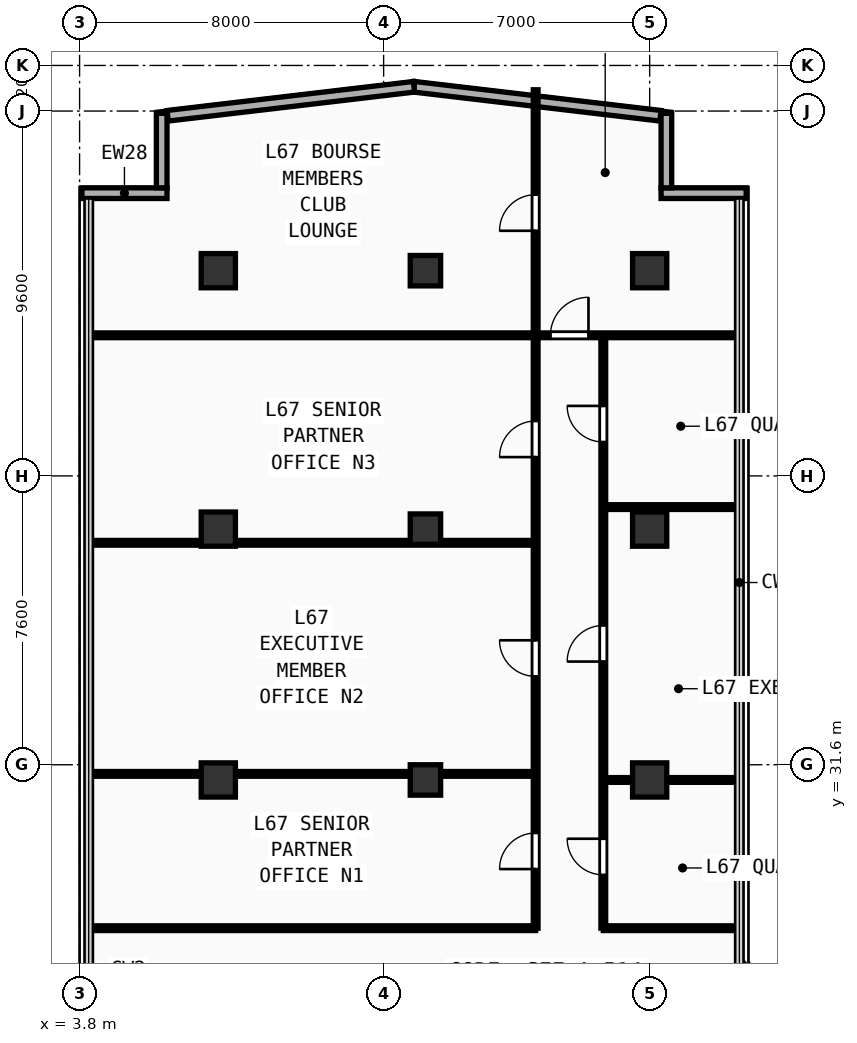
"""IFC4 building model, lengths in metres.
Left out: names, types, materials, properties, quantities, classifications, styles, units other than length and angle.
Written with IfcOpenShell. Run it as: python <this file> out.ifc"""

import sys

from ifc_helpers import new_model, si_unit, direction, frame, frame_2d, origin, origin_2d, place, context, subcontext, project, spatial, rectangle, extrude, element, fill, save


model = new_model("IFC4")
c1 = context("Model", 3, precision=1e-05, world=origin(), true_north=direction((0.0, 1.0)))
c2 = subcontext(c1, "Body", "Model", "MODEL_VIEW")
j1 = project(units=[si_unit("LENGTHUNIT", "METRE"), si_unit("PLANEANGLEUNIT", "RADIAN")], contexts=[c1])
p1 = place(None, origin())
s1 = spatial("IfcSite", under=j1, at=p1, CompositionType="ELEMENT")
p2 = place(p1, origin())
s2 = spatial("IfcBuilding", under=s1, at=p2, CompositionType="ELEMENT")
p3 = place(p2, frame((0.0, 0.0, 262.8)))
s3 = spatial("IfcBuildingStorey", under=s2, at=p3, CompositionType="ELEMENT", Elevation=262.8)
for number, where, z_axis, x_axis in (
    (1, (7.45, 31.2, 0.0), (0.0, 0.0, 1.0), (1.0, 0.0, 0.0)),
    (2, (7.45, 37.8, 0.0), (0.0, 0.0, 1.0), (1.0, 0.0, 0.0)),
    (3, (7.45, 44.6, 0.0), (0.0, 0.0, 1.0), (1.0, 0.0, 0.0)),
    (4, (18.8, 31.2, 0.0), (0.0, 0.0, 1.0), (1.0, 0.0, 0.0)),
    (5, (18.8, 37.8, 0.0), (0.0, 0.0, 1.0), (1.0, 0.0, 0.0)),
    (6, (18.8, 44.6, 0.0), (0.0, 0.0, 1.0), (1.0, 0.0, 0.0)),
):
    element("IfcColumn", number, at=place(p3, frame(where, z_axis=z_axis, x_axis=x_axis)), inside=s3, PredefinedType="COLUMN", context=c2, shape_type="SweptSolid", body=[
        extrude(rectangle(XDim=0.9, YDim=0.9, at=origin_2d()), origin(), (0.0, 0.0, 1.0), 3.56),
    ])
for number, where, z_axis, x_axis in (
    (7, (12.9, 31.2, 0.0), (0.0, 0.0, 1.0), (1.0, 0.0, 0.0)),
    (8, (12.9, 37.8, 0.0), (0.0, 0.0, 1.0), (1.0, 0.0, 0.0)),
    (9, (12.9, 44.6, 0.0), (0.0, 0.0, 1.0), (1.0, 0.0, 0.0)),
):
    element("IfcColumn", number, at=place(p3, frame(where, z_axis=z_axis, x_axis=x_axis)), inside=s3, PredefinedType="COLUMN", context=c2, shape_type="SweptSolid", body=[
        extrude(rectangle(XDim=0.8, YDim=0.8, at=origin_2d()), origin(), (0.0, 0.0, 1.0), 3.56),
    ])
p4 = place(p3, frame((19.1, 46.64, 0.0), z_axis=(0.0, 0.0, 1.0), x_axis=(1.0, 0.0, 0.0)))
e10 = element("IfcWall", 10, at=p4, inside=s3, PredefinedType="SOLIDWALL", context=c2, shape_type="SweptSolid", body=[
    extrude(rectangle(XDim=2.24, YDim=0.28, at=frame_2d((1.12, 0.0))), origin(), (0.0, 0.0, 1.0), 3.56),
])
p5 = place(p3, frame((19.24, 46.78, 0.0), z_axis=(0.0, 0.0, 1.0), x_axis=(0.0, 1.0, 0.0)))
e11 = element("IfcWall", 11, at=p5, inside=s3, PredefinedType="SOLIDWALL", context=c2, shape_type="SweptSolid", body=[
    extrude(rectangle(XDim=1.96, YDim=0.28, at=frame_2d((0.98, 0.0))), origin(), (0.0, 0.0, 1.0), 3.56),
])
p6 = place(p3, frame((3.86, 46.64, 0.0), z_axis=(0.0, 0.0, 1.0), x_axis=(1.0, 0.0, 0.0)))
e12 = element("IfcWall", 12, at=p6, inside=s3, PredefinedType="SOLIDWALL", context=c2, shape_type="SweptSolid", body=[
    extrude(rectangle(XDim=2.24, YDim=0.28, at=frame_2d((1.12, 0.0))), origin(), (0.0, 0.0, 1.0), 3.56),
])
p7 = place(p3, frame((5.96, 46.78, 0.0), z_axis=(0.0, 0.0, 1.0), x_axis=(0.0, 1.0, 0.0)))
e13 = element("IfcWall", 13, at=p7, inside=s3, PredefinedType="SOLIDWALL", context=c2, shape_type="SweptSolid", body=[
    extrude(rectangle(XDim=1.96, YDim=0.28, at=frame_2d((0.98, 0.0))), origin(), (0.0, 0.0, 1.0), 3.56),
])
p8 = place(p3, frame((27.685, 19.775, 0.0), z_axis=(0.0, 0.0, 1.0), x_axis=(-0.707106781187, 0.707106781187, 0.0)))
e14 = element("IfcWall", 14, at=p8, inside=s3, PredefinedType="SOLIDWALL", context=c2, shape_type="SweptSolid", body=[
    extrude(rectangle(XDim=9.207, YDim=0.28, at=frame_2d((4.603, 0.0))), origin(), (0.0, 0.0, 1.0), 3.56),
])
for number, where, z_axis, x_axis in (
    (15, (19.083, 48.676, 0.0), (0.0, 0.0, 1.0), (-0.993, 0.117, 0.0)),
    (16, (12.599, 49.439, 0.0), (0.0, 0.0, 1.0), (-0.993, -0.117, 0.0)),
):
    element("IfcWall", number, at=place(p3, frame(where, z_axis=z_axis, x_axis=x_axis)), inside=s3, PredefinedType="SOLIDWALL", context=c2, shape_type="SweptSolid", body=[
        extrude(rectangle(XDim=6.527, YDim=0.28, at=frame_2d((3.263, 0.0))), origin(), (0.0, 0.0, 1.0), 3.56),
    ])
p9 = place(p3, frame((4.04, 27.3, 0.0), z_axis=(0.0, 0.0, 1.0), x_axis=(1.0, 0.0, 0.0)))
e17 = element("IfcWall", 17, at=p9, inside=s3, PredefinedType="PARTITIONING", context=c2, shape_type="SweptSolid", body=[
    extrude(rectangle(XDim=11.76, YDim=0.125, at=frame_2d((5.88, 0.0))), origin(), (0.0, 0.0, 1.0), 3.56),
])
p10 = place(p3, frame((15.8, 27.3, 0.0), z_axis=(0.0, 0.0, 1.0), x_axis=(0.0, 1.0, 0.0)))
e18 = element("IfcWall", 18, at=p10, inside=s3, PredefinedType="PARTITIONING", context=c2, shape_type="SweptSolid", body=[
    extrude(rectangle(XDim=15.6, YDim=0.125, at=frame_2d((7.8, 0.0))), origin(), (0.0, 0.0, 1.0), 3.56),
])
p11 = place(p10, frame((1.555, 0.0, 0.0)))
e19 = element("IfcOpeningElement", 19, at=p11, cuts=e18, PredefinedType="OPENING", context=c2, shape_type="SweptSolid", body=[
    extrude(rectangle(XDim=0.95, YDim=2.15, at=frame_2d((0.475, 1.075))), frame((0.0, 0.073, 0.0), z_axis=(0.0, -1.0, 0.0), x_axis=(1.0, 0.0, 0.0)), (0.0, 0.0, 1.0), 0.145),
])
p12 = place(p10, frame((6.625, 0.0, 0.0)))
e20 = element("IfcOpeningElement", 20, at=p12, cuts=e18, PredefinedType="OPENING", context=c2, shape_type="SweptSolid", body=[
    extrude(rectangle(XDim=0.95, YDim=2.15, at=frame_2d((0.475, 1.075))), frame((0.0, 0.073, 0.0), z_axis=(0.0, -1.0, 0.0), x_axis=(1.0, 0.0, 0.0)), (0.0, 0.0, 1.0), 0.145),
])
p13 = place(p10, frame((12.395, 0.0, 0.0)))
e21 = element("IfcOpeningElement", 21, at=p13, cuts=e18, PredefinedType="OPENING", context=c2, shape_type="SweptSolid", body=[
    extrude(rectangle(XDim=0.95, YDim=2.15, at=frame_2d((0.475, 1.075))), frame((0.0, 0.073, 0.0), z_axis=(0.0, -1.0, 0.0), x_axis=(1.0, 0.0, 0.0)), (0.0, 0.0, 1.0), 0.145),
])
for number, where, z_axis, x_axis in (
    (22, (4.04, 31.36, 0.0), (0.0, 0.0, 1.0), (1.0, 0.0, 0.0)),
    (23, (4.04, 37.44, 0.0), (0.0, 0.0, 1.0), (1.0, 0.0, 0.0)),
):
    element("IfcWall", number, at=place(p3, frame(where, z_axis=z_axis, x_axis=x_axis)), inside=s3, PredefinedType="PARTITIONING", context=c2, shape_type="SweptSolid", body=[
        extrude(rectangle(XDim=11.76, YDim=0.125, at=frame_2d((5.88, 0.0))), origin(), (0.0, 0.0, 1.0), 2.798),
    ])
p14 = place(p3, frame((4.04, 42.9, 0.0), z_axis=(0.0, 0.0, 1.0), x_axis=(1.0, 0.0, 0.0)))
e24 = element("IfcWall", 24, at=p14, inside=s3, PredefinedType="PARTITIONING", context=c2, shape_type="SweptSolid", body=[
    extrude(rectangle(XDim=17.12, YDim=0.125, at=frame_2d((8.56, 0.0))), origin(), (0.0, 0.0, 1.0), 3.56),
])
p15 = place(p14, frame((12.15, 0.0, 0.0)))
e25 = element("IfcOpeningElement", 25, at=p15, cuts=e24, PredefinedType="OPENING", context=c2, shape_type="SweptSolid", body=[
    extrude(rectangle(XDim=1.0, YDim=2.2, at=frame_2d((0.5, 1.1))), frame((0.0, 0.073, 0.0), z_axis=(0.0, -1.0, 0.0), x_axis=(1.0, 0.0, 0.0)), (0.0, 0.0, 1.0), 0.145),
])
p16 = place(p3, frame((15.8, 42.9, 0.0), z_axis=(0.0, 0.0, 1.0), x_axis=(0.0, 1.0, 0.0)))
e26 = element("IfcWall", 26, at=p16, inside=s3, PredefinedType="PARTITIONING", context=c2, shape_type="SweptSolid", body=[
    extrude(rectangle(XDim=6.46, YDim=0.125, at=frame_2d((3.23, 0.0))), origin(), (0.0, 0.0, 1.0), 3.56),
])
p17 = place(p16, frame((2.75, 0.0, 0.0)))
e27 = element("IfcOpeningElement", 27, at=p17, cuts=e26, PredefinedType="OPENING", context=c2, shape_type="SweptSolid", body=[
    extrude(rectangle(XDim=0.95, YDim=2.15, at=frame_2d((0.475, 1.075))), frame((0.0, 0.073, 0.0), z_axis=(0.0, -1.0, 0.0), x_axis=(1.0, 0.0, 0.0)), (0.0, 0.0, 1.0), 0.145),
])
p18 = place(p3, frame((17.58, 27.3, 0.0), z_axis=(0.0, 0.0, 1.0), x_axis=(1.0, 0.0, 0.0)))
e28 = element("IfcWall", 28, at=p18, inside=s3, PredefinedType="PARTITIONING", context=c2, shape_type="SweptSolid", body=[
    extrude(rectangle(XDim=3.58, YDim=0.125, at=frame_2d((1.79, 0.0))), origin(), (0.0, 0.0, 1.0), 3.56),
])
p19 = place(p3, frame((17.58, 27.3, 0.0), z_axis=(0.0, 0.0, 1.0), x_axis=(0.0, 1.0, 0.0)))
e29 = element("IfcWall", 29, at=p19, inside=s3, PredefinedType="PARTITIONING", context=c2, shape_type="SweptSolid", body=[
    extrude(rectangle(XDim=15.6, YDim=0.125, at=frame_2d((7.8, 0.0))), origin(), (0.0, 0.0, 1.0), 3.56),
])
p20 = place(p19, frame((1.403, 0.0, 0.0)))
e30 = element("IfcOpeningElement", 30, at=p20, cuts=e29, PredefinedType="OPENING", context=c2, shape_type="SweptSolid", body=[
    extrude(rectangle(XDim=0.95, YDim=2.15, at=frame_2d((0.475, 1.075))), frame((0.0, 0.073, 0.0), z_axis=(0.0, -1.0, 0.0), x_axis=(1.0, 0.0, 0.0)), (0.0, 0.0, 1.0), 0.145),
])
p21 = place(p19, frame((7.015, 0.0, 0.0)))
e31 = element("IfcOpeningElement", 31, at=p21, cuts=e29, PredefinedType="OPENING", context=c2, shape_type="SweptSolid", body=[
    extrude(rectangle(XDim=0.95, YDim=2.15, at=frame_2d((0.475, 1.075))), frame((0.0, 0.073, 0.0), z_axis=(0.0, -1.0, 0.0), x_axis=(1.0, 0.0, 0.0)), (0.0, 0.0, 1.0), 0.145),
])
p22 = place(p19, frame((12.792, 0.0, 0.0)))
e32 = element("IfcOpeningElement", 32, at=p22, cuts=e29, PredefinedType="OPENING", context=c2, shape_type="SweptSolid", body=[
    extrude(rectangle(XDim=0.95, YDim=2.15, at=frame_2d((0.475, 1.075))), frame((0.0, 0.073, 0.0), z_axis=(0.0, -1.0, 0.0), x_axis=(1.0, 0.0, 0.0)), (0.0, 0.0, 1.0), 0.145),
])
p23 = place(p3, frame((17.58, 31.2, 0.0), z_axis=(0.0, 0.0, 1.0), x_axis=(1.0, 0.0, 0.0)))
e33 = element("IfcWall", 33, at=p23, inside=s3, PredefinedType="PARTITIONING", context=c2, shape_type="SweptSolid", body=[
    extrude(rectangle(XDim=3.58, YDim=0.125, at=frame_2d((1.79, 0.0))), origin(), (0.0, 0.0, 1.0), 2.798),
])
p24 = place(p3, frame((17.58, 38.38, 0.0), z_axis=(0.0, 0.0, 1.0), x_axis=(1.0, 0.0, 0.0)))
e34 = element("IfcWall", 34, at=p24, inside=s3, PredefinedType="PARTITIONING", context=c2, shape_type="SweptSolid", body=[
    extrude(rectangle(XDim=3.58, YDim=0.125, at=frame_2d((1.79, 0.0))), origin(), (0.0, 0.0, 1.0), 3.56),
])
p25 = place(p11, origin())
e35 = element("IfcDoor", 35, at=p25, inside=s3, OperationType="SINGLE_SWING_LEFT", PredefinedType="DOOR", context=c2, shape_type="SweptSolid", body=[
    extrude(rectangle(XDim=0.95, YDim=2.15, at=frame_2d((0.475, 1.075))), frame((0.0, 0.025, 0.0), z_axis=(0.0, -1.0, 0.0), x_axis=(1.0, 0.0, 0.0)), (0.0, 0.0, 1.0), 0.05),
])
fill(e19, e35)
p26 = place(p12, origin())
e36 = element("IfcDoor", 36, at=p26, inside=s3, OperationType="SINGLE_SWING_RIGHT", PredefinedType="DOOR", context=c2, shape_type="SweptSolid", body=[
    extrude(rectangle(XDim=0.95, YDim=2.15, at=frame_2d((0.475, 1.075))), frame((0.0, 0.025, 0.0), z_axis=(0.0, -1.0, 0.0), x_axis=(1.0, 0.0, 0.0)), (0.0, 0.0, 1.0), 0.05),
])
fill(e20, e36)
p27 = place(p13, origin())
e37 = element("IfcDoor", 37, at=p27, inside=s3, OperationType="SINGLE_SWING_LEFT", PredefinedType="DOOR", context=c2, shape_type="SweptSolid", body=[
    extrude(rectangle(XDim=0.95, YDim=2.15, at=frame_2d((0.475, 1.075))), frame((0.0, 0.025, 0.0), z_axis=(0.0, -1.0, 0.0), x_axis=(1.0, 0.0, 0.0)), (0.0, 0.0, 1.0), 0.05),
])
fill(e21, e37)
p28 = place(p15, origin())
e38 = element("IfcDoor", 38, at=p28, inside=s3, OperationType="SINGLE_SWING_RIGHT", PredefinedType="DOOR", context=c2, shape_type="SweptSolid", body=[
    extrude(rectangle(XDim=1.0, YDim=2.2, at=frame_2d((0.5, 1.1))), frame((0.0, 0.025, 0.0), z_axis=(0.0, -1.0, 0.0), x_axis=(1.0, 0.0, 0.0)), (0.0, 0.0, 1.0), 0.05),
])
fill(e25, e38)
p29 = place(p17, origin())
e39 = element("IfcDoor", 39, at=p29, inside=s3, OperationType="SINGLE_SWING_LEFT", PredefinedType="DOOR", context=c2, shape_type="SweptSolid", body=[
    extrude(rectangle(XDim=0.95, YDim=2.15, at=frame_2d((0.475, 1.075))), frame((0.0, 0.025, 0.0), z_axis=(0.0, -1.0, 0.0), x_axis=(1.0, 0.0, 0.0)), (0.0, 0.0, 1.0), 0.05),
])
fill(e27, e39)
p30 = place(p20, origin())
e40 = element("IfcDoor", 40, at=p30, inside=s3, OperationType="SINGLE_SWING_RIGHT", PredefinedType="DOOR", context=c2, shape_type="SweptSolid", body=[
    extrude(rectangle(XDim=0.95, YDim=2.15, at=frame_2d((0.475, 1.075))), frame((0.0, 0.025, 0.0), z_axis=(0.0, -1.0, 0.0), x_axis=(1.0, 0.0, 0.0)), (0.0, 0.0, 1.0), 0.05),
])
fill(e30, e40)
p31 = place(p21, origin())
e41 = element("IfcDoor", 41, at=p31, inside=s3, OperationType="SINGLE_SWING_LEFT", PredefinedType="DOOR", context=c2, shape_type="SweptSolid", body=[
    extrude(rectangle(XDim=0.95, YDim=2.15, at=frame_2d((0.475, 1.075))), frame((0.0, 0.025, 0.0), z_axis=(0.0, -1.0, 0.0), x_axis=(1.0, 0.0, 0.0)), (0.0, 0.0, 1.0), 0.05),
])
fill(e31, e41)
p32 = place(p22, origin())
e42 = element("IfcDoor", 42, at=p32, inside=s3, OperationType="SINGLE_SWING_RIGHT", PredefinedType="DOOR", context=c2, shape_type="SweptSolid", body=[
    extrude(rectangle(XDim=0.95, YDim=2.15, at=frame_2d((0.475, 1.075))), frame((0.0, 0.025, 0.0), z_axis=(0.0, -1.0, 0.0), x_axis=(1.0, 0.0, 0.0)), (0.0, 0.0, 1.0), 0.05),
])
fill(e32, e42)
save(model, sys.argv[1])
